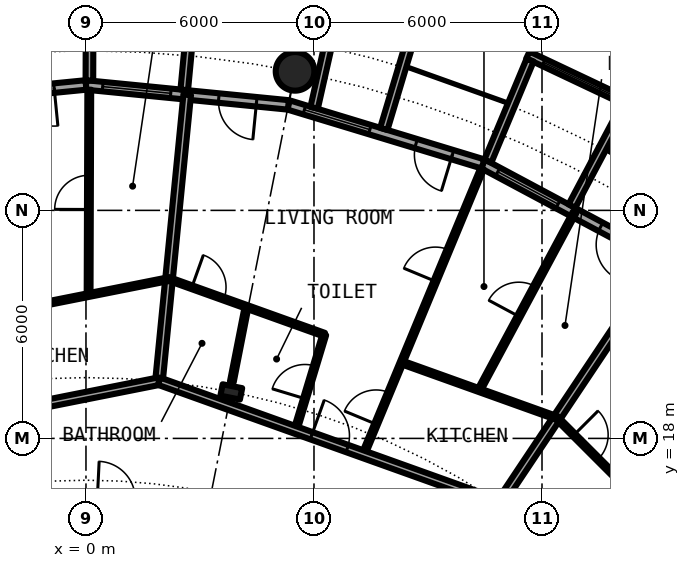
"""IFC4 building model, lengths in metres.
Left out: names, types, materials, properties, quantities, classifications, styles, units other than length and angle.
Written with IfcOpenShell. Run it as: python <this file> out.ifc"""

import sys

from ifc_helpers import new_model, si_unit, direction, frame, frame_2d, origin, origin_2d, place, context, subcontext, project, spatial, rectangle, circle, hollow_circle, i_section, extrude, element, fill, save


model = new_model("IFC4")
c1 = context("Model", 3, precision=1e-05, world=origin(), true_north=direction((0.0, 1.0)))
c2 = subcontext(c1, "Body", "Model", "MODEL_VIEW")
j1 = project(units=[si_unit("LENGTHUNIT", "METRE"), si_unit("PLANEANGLEUNIT", "RADIAN")], contexts=[c1])
p1 = place(None, origin())
s1 = spatial("IfcSite", under=j1, at=p1, CompositionType="ELEMENT")
p2 = place(p1, origin())
s2 = spatial("IfcBuilding", under=s1, at=p2, CompositionType="ELEMENT")
p3 = place(p2, frame((0.0, 0.0, 63.6)))
s3 = spatial("IfcBuildingStorey", under=s2, at=p3, CompositionType="ELEMENT", Elevation=63.6)
p4 = place(p3, frame((5.501, 27.658, 0.0), z_axis=(0.0, 0.0, 1.0), x_axis=(1.0, 0.0, 0.0)))
e1 = element("IfcColumn", 1, at=p4, inside=s3, PredefinedType="COLUMN", context=c2, shape_type="SweptSolid", body=[
    extrude(hollow_circle(Radius=0.508, WallThickness=0.04, at=origin_2d()), origin(), (0.0, 0.0, 1.0), 3.05),
])
p5 = place(p3, frame((3.824, 19.223, 0.0), z_axis=(0.0, 0.0, 1.0), x_axis=(0.195090322016, 0.980785280403, 0.0)))
e2 = element("IfcColumn", 2, at=p5, inside=s3, PredefinedType="COLUMN", context=c2, shape_type="SweptSolid", body=[
    extrude(i_section(OverallWidth=0.306, OverallDepth=0.524, WebThickness=0.021, FlangeThickness=0.04, FilletRadius=0.027, at=origin_2d()), origin(), (0.0, 0.0, 1.0), 3.05),
])
p6 = place(p3, frame((15.167, 22.699, 0.0), z_axis=(0.0, 0.0, 1.0), x_axis=(-0.881915646801, 0.471407246368, 0.0)))
e3 = element("IfcWall", 3, at=p6, inside=s3, PredefinedType="SOLIDWALL", context=c2, shape_type="SweptSolid", body=[
    extrude(rectangle(XDim=5.352, YDim=0.25, at=frame_2d((2.676, 0.0))), origin(), (0.0, 0.0, 1.0), 2.7),
])
p7 = place(p6, frame((0.841, 0.0, 0.0)))
e4 = element("IfcOpeningElement", 4, at=p7, cuts=e3, PredefinedType="OPENING", context=c2, shape_type="SweptSolid", body=[
    extrude(rectangle(XDim=1.0, YDim=2.2, at=frame_2d((0.5, 1.1))), frame((0.0, 0.135, 0.0), z_axis=(0.0, -1.0, 0.0), x_axis=(1.0, 0.0, 0.0)), (0.0, 0.0, 1.0), 0.27),
])
p8 = place(p6, frame((3.111, 0.0, 0.3)))
e5 = element("IfcOpeningElement", 5, at=p8, cuts=e3, PredefinedType="OPENING", context=c2, shape_type="SweptSolid", body=[
    extrude(rectangle(XDim=1.8, YDim=2.1, at=frame_2d((0.9, 1.05))), frame((0.0, 0.135, 0.0), z_axis=(0.0, -1.0, 0.0), x_axis=(1.0, 0.0, 0.0)), (0.0, 0.0, 1.0), 0.27),
])
p9 = place(p3, frame((14.335, 26.808, -0.03), z_axis=(0.0, 0.0, 1.0), x_axis=(-0.904000060331, 0.427532327342, 0.0)))
e6 = element("IfcWall", 6, at=p9, inside=s3, PredefinedType="SOLIDWALL", context=c2, shape_type="SweptSolid", body=[
    extrude(rectangle(XDim=2.993, YDim=0.2, at=frame_2d((1.497, 0.0))), origin(), (0.0, 0.0, 1.0), 2.73),
])
p10 = place(p9, frame((0.457, 0.0, 0.33)))
e7 = element("IfcOpeningElement", 7, at=p10, cuts=e6, PredefinedType="OPENING", context=c2, shape_type="SweptSolid", body=[
    extrude(circle(Radius=1.04, at=frame_2d((1.04, 1.04))), frame((0.0, 0.11, 0.0), z_axis=(0.0, -1.0, 0.0), x_axis=(1.0, 0.0, 0.0)), (0.0, 0.0, 1.0), 0.22),
])
p11 = place(p3, frame((12.787, 24.113, -0.03), z_axis=(0.0, 0.0, 1.0), x_axis=(0.468365282436, 0.883534924159, 0.0)))
e8 = element("IfcWall", 8, at=p11, inside=s3, PredefinedType="SOLIDWALL", context=c2, shape_type="SweptSolid", body=[
    extrude(rectangle(XDim=3.006, YDim=0.2, at=frame_2d((1.503, 0.0))), origin(), (0.0, 0.0, 1.0), 2.73),
])
p12 = place(p3, frame((10.575, 25.295, -0.03), z_axis=(0.0, 0.0, 1.0), x_axis=(0.385697364644, 0.922625353492, 0.0)))
e9 = element("IfcWall", 9, at=p12, inside=s3, PredefinedType="SOLIDWALL", context=c2, shape_type="SweptSolid", body=[
    extrude(rectangle(XDim=2.883, YDim=0.2, at=frame_2d((1.442, 0.0))), origin(), (0.0, 0.0, 1.0), 2.73),
])
p13 = place(p3, frame((10.447, 25.222, 0.0), z_axis=(0.0, 0.0, 1.0), x_axis=(-0.956965678721, 0.290201119486, 0.0)))
e10 = element("IfcWall", 10, at=p13, inside=s3, PredefinedType="SOLIDWALL", context=c2, shape_type="SweptSolid", body=[
    extrude(rectangle(XDim=5.351, YDim=0.25, at=frame_2d((2.676, 0.0))), origin(), (0.0, 0.0, 1.0), 2.7),
])
p14 = place(p13, frame((0.841, 0.0, 0.0)))
e11 = element("IfcOpeningElement", 11, at=p14, cuts=e10, PredefinedType="OPENING", context=c2, shape_type="SweptSolid", body=[
    extrude(rectangle(XDim=1.0, YDim=2.2, at=frame_2d((0.5, 1.1))), frame((0.0, 0.135, 0.0), z_axis=(0.0, -1.0, 0.0), x_axis=(1.0, 0.0, 0.0)), (0.0, 0.0, 1.0), 0.27),
])
p15 = place(p13, frame((3.111, 0.0, 0.3)))
e12 = element("IfcOpeningElement", 12, at=p15, cuts=e10, PredefinedType="OPENING", context=c2, shape_type="SweptSolid", body=[
    extrude(rectangle(XDim=1.8, YDim=2.1, at=frame_2d((0.9, 1.05))), frame((0.0, 0.135, 0.0), z_axis=(0.0, -1.0, 0.0), x_axis=(1.0, 0.0, 0.0)), (0.0, 0.0, 1.0), 0.27),
])
p16 = place(p3, frame((7.837, 26.144, -0.03), z_axis=(0.0, 0.0, 1.0), x_axis=(0.287064767992, 0.957911174889, 0.0)))
e13 = element("IfcWall", 13, at=p16, inside=s3, PredefinedType="SOLIDWALL", context=c2, shape_type="SweptSolid", body=[
    extrude(rectangle(XDim=3.006, YDim=0.2, at=frame_2d((1.503, 0.0))), origin(), (0.0, 0.0, 1.0), 2.73),
])
p17 = place(p3, frame((6.004, 26.7, -0.03), z_axis=(0.0, 0.0, 1.0), x_axis=(0.219609259383, 0.975587911566, 0.0)))
e14 = element("IfcWall", 14, at=p17, inside=s3, PredefinedType="SOLIDWALL", context=c2, shape_type="SweptSolid", body=[
    extrude(rectangle(XDim=2.933, YDim=0.2, at=frame_2d((1.466, 0.0))), origin(), (0.0, 0.0, 1.0), 2.73),
])
p18 = place(p3, frame((5.326, 26.775, 0.0), z_axis=(0.0, 0.0, 1.0), x_axis=(-0.995173996315, 0.098126026407, 0.0)))
e15 = element("IfcWall", 15, at=p18, inside=s3, PredefinedType="SOLIDWALL", context=c2, shape_type="SweptSolid", body=[
    extrude(rectangle(XDim=5.352, YDim=0.25, at=frame_2d((2.676, 0.0))), origin(), (0.0, 0.0, 1.0), 2.7),
])
p19 = place(p18, frame((0.841, 0.0, 0.0)))
e16 = element("IfcOpeningElement", 16, at=p19, cuts=e15, PredefinedType="OPENING", context=c2, shape_type="SweptSolid", body=[
    extrude(rectangle(XDim=1.0, YDim=2.2, at=frame_2d((0.5, 1.1))), frame((0.0, 0.135, 0.0), z_axis=(0.0, -1.0, 0.0), x_axis=(1.0, 0.0, 0.0)), (0.0, 0.0, 1.0), 0.27),
])
p20 = place(p18, frame((3.111, 0.0, 0.3)))
e17 = element("IfcOpeningElement", 17, at=p20, cuts=e15, PredefinedType="OPENING", context=c2, shape_type="SweptSolid", body=[
    extrude(rectangle(XDim=1.8, YDim=2.1, at=frame_2d((0.9, 1.05))), frame((0.0, 0.135, 0.0), z_axis=(0.0, -1.0, 0.0), x_axis=(1.0, 0.0, 0.0)), (0.0, 0.0, 1.0), 0.27),
])
p21 = place(p3, frame((2.586, 27.171, -0.03), z_axis=(0.0, 0.0, 1.0), x_axis=(0.094548432284, 0.995520262954, 0.0)))
e18 = element("IfcWall", 18, at=p21, inside=s3, PredefinedType="SOLIDWALL", context=c2, shape_type="SweptSolid", body=[
    extrude(rectangle(XDim=3.006, YDim=0.2, at=frame_2d((1.503, 0.0))), origin(), (0.0, 0.0, 1.0), 2.73),
])
p22 = place(p3, frame((0.09, 27.417, -0.03), z_axis=(0.0, 0.0, 1.0), x_axis=(0.00347308367, 0.999993968827, 0.0)))
e19 = element("IfcWall", 19, at=p22, inside=s3, PredefinedType="SOLIDWALL", context=c2, shape_type="SweptSolid", body=[
    extrude(rectangle(XDim=2.882, YDim=0.2, at=frame_2d((1.441, 0.0))), origin(), (0.0, 0.0, 1.0), 2.73),
])
p23 = place(p3, frame((0.0, 27.3, 0.0), z_axis=(0.0, 0.0, 1.0), x_axis=(-0.995173996315, -0.098126026407, 0.0)))
e20 = element("IfcWall", 20, at=p23, inside=s3, PredefinedType="SOLIDWALL", context=c2, shape_type="SweptSolid", body=[
    extrude(rectangle(XDim=5.352, YDim=0.25, at=frame_2d((2.676, 0.0))), origin(), (0.0, 0.0, 1.0), 2.7),
])
p24 = place(p23, frame((0.841, 0.0, 0.0)))
e21 = element("IfcOpeningElement", 21, at=p24, cuts=e20, PredefinedType="OPENING", context=c2, shape_type="SweptSolid", body=[
    extrude(rectangle(XDim=1.0, YDim=2.2, at=frame_2d((0.5, 1.1))), frame((0.0, 0.135, 0.0), z_axis=(0.0, -1.0, 0.0), x_axis=(1.0, 0.0, 0.0)), (0.0, 0.0, 1.0), 0.27),
])
p25 = place(p23, frame((3.111, 0.0, 0.3)))
e22 = element("IfcOpeningElement", 22, at=p25, cuts=e20, PredefinedType="OPENING", context=c2, shape_type="SweptSolid", body=[
    extrude(rectangle(XDim=1.8, YDim=2.1, at=frame_2d((0.9, 1.05))), frame((0.0, 0.135, 0.0), z_axis=(0.0, -1.0, 0.0), x_axis=(1.0, 0.0, 0.0)), (0.0, 0.0, 1.0), 0.27),
])
p26 = place(p3, frame((0.069, 21.772, 0.0), z_axis=(0.0, 0.0, 1.0), x_axis=(0.003298522564, 0.99999455986, 0.0)))
e23 = element("IfcWall", 23, at=p26, inside=s3, PredefinedType="PARTITIONING", context=c2, shape_type="SweptSolid", body=[
    extrude(rectangle(XDim=5.403, YDim=0.1, at=frame_2d((2.702, 0.0))), origin(), (0.0, 0.0, 1.0), 2.7),
])
p27 = place(p26, frame((2.252, 0.0, 0.0)))
e24 = element("IfcOpeningElement", 24, at=p27, cuts=e23, PredefinedType="OPENING", context=c2, shape_type="SweptSolid", body=[
    extrude(rectangle(XDim=0.9, YDim=2.3, at=frame_2d((0.45, 1.15))), frame((0.0, 0.06, 0.0), z_axis=(0.0, -1.0, 0.0), x_axis=(1.0, 0.0, 0.0)), (0.0, 0.0, 1.0), 0.12),
])
p28 = place(p3, frame((1.921, 19.506, 0.0), z_axis=(0.0, 0.0, 1.0), x_axis=(0.098115395479, 0.995175044487, 0.0)))
e25 = element("IfcWall", 25, at=p28, inside=s3, PredefinedType="PARTITIONING", context=c2, shape_type="SweptSolid", body=[
    extrude(rectangle(XDim=7.574, YDim=0.2, at=frame_2d((3.787, 0.0))), origin(), (0.0, 0.0, 1.0), 2.7),
])
p29 = place(p3, frame((3.838, 19.488, 0.0), z_axis=(0.0, 0.0, 1.0), x_axis=(0.192964397841, 0.981205758832, 0.0)))
e26 = element("IfcWall", 26, at=p29, inside=s3, PredefinedType="PARTITIONING", context=c2, shape_type="SweptSolid", body=[
    extrude(rectangle(XDim=2.012, YDim=0.1, at=frame_2d((1.006, 0.0))), origin(), (0.0, 0.0, 1.0), 2.7),
])
p30 = place(p3, frame((5.513, 18.22, 0.0), z_axis=(0.0, 0.0, 1.0), x_axis=(0.289456951726, 0.957191032709, 0.0)))
e27 = element("IfcWall", 27, at=p30, inside=s3, PredefinedType="PARTITIONING", context=c2, shape_type="SweptSolid", body=[
    extrude(rectangle(XDim=2.622, YDim=0.1, at=frame_2d((1.311, 0.0))), origin(), (0.0, 0.0, 1.0), 2.7),
])
p31 = place(p30, frame((0.862, 0.0, 0.0)))
e28 = element("IfcOpeningElement", 28, at=p31, cuts=e27, PredefinedType="OPENING", context=c2, shape_type="SweptSolid", body=[
    extrude(rectangle(XDim=0.9, YDim=2.3, at=frame_2d((0.45, 1.15))), frame((0.0, 0.06, 0.0), z_axis=(0.0, -1.0, 0.0), x_axis=(1.0, 0.0, 0.0)), (0.0, 0.0, 1.0), 0.12),
])
p32 = place(p3, frame((7.302, 17.58, 0.0), z_axis=(0.0, 0.0, 1.0), x_axis=(0.383616168183, 0.923492628833, 0.0)))
e29 = element("IfcWall", 29, at=p32, inside=s3, PredefinedType="PARTITIONING", context=c2, shape_type="SweptSolid", body=[
    extrude(rectangle(XDim=8.138, YDim=0.1, at=frame_2d((4.069, 0.0))), origin(), (0.0, 0.0, 1.0), 2.7),
])
p33 = place(p32, frame((0.861, 0.0, 0.0)))
e30 = element("IfcOpeningElement", 30, at=p33, cuts=e29, PredefinedType="OPENING", context=c2, shape_type="SweptSolid", body=[
    extrude(rectangle(XDim=0.9, YDim=2.3, at=frame_2d((0.45, 1.15))), frame((0.0, 0.06, 0.0), z_axis=(0.0, -1.0, 0.0), x_axis=(1.0, 0.0, 0.0)), (0.0, 0.0, 1.0), 0.12),
])
p34 = place(p32, frame((4.931, 0.0, 0.0)))
e31 = element("IfcOpeningElement", 31, at=p34, cuts=e29, PredefinedType="OPENING", context=c2, shape_type="SweptSolid", body=[
    extrude(rectangle(XDim=0.9, YDim=2.3, at=frame_2d((0.45, 1.15))), frame((0.0, 0.06, 0.0), z_axis=(0.0, -1.0, 0.0), x_axis=(1.0, 0.0, 0.0)), (0.0, 0.0, 1.0), 0.12),
])
p35 = place(p3, frame((10.349, 19.272, 0.0), z_axis=(0.0, 0.0, 1.0), x_axis=(0.472967735543, 0.881079747319, 0.0)))
e32 = element("IfcWall", 32, at=p35, inside=s3, PredefinedType="PARTITIONING", context=c2, shape_type="SweptSolid", body=[
    extrude(rectangle(XDim=5.3, YDim=0.1, at=frame_2d((2.65, 0.0))), origin(), (0.0, 0.0, 1.0), 2.7),
])
p36 = place(p35, frame((2.2, 0.0, 0.0)))
e33 = element("IfcOpeningElement", 33, at=p36, cuts=e32, PredefinedType="OPENING", context=c2, shape_type="SweptSolid", body=[
    extrude(rectangle(XDim=0.9, YDim=2.3, at=frame_2d((0.45, 1.15))), frame((0.0, 0.06, 0.0), z_axis=(0.0, -1.0, 0.0), x_axis=(1.0, 0.0, 0.0)), (0.0, 0.0, 1.0), 0.12),
])
p37 = place(p3, frame((11.035, 16.515, 0.0), z_axis=(0.0, 0.0, 1.0), x_axis=(0.555516661303, 0.831505405283, 0.0)))
e34 = element("IfcWall", 34, at=p37, inside=s3, PredefinedType="PARTITIONING", context=c2, shape_type="SweptSolid", body=[
    extrude(rectangle(XDim=7.312, YDim=0.2, at=frame_2d((3.656, 0.0))), origin(), (0.0, 0.0, 1.0), 2.7),
])
p38 = place(p3, frame((-9.239, 17.286, 0.0), z_axis=(0.0, 0.0, 1.0), x_axis=(0.98077905287, 0.195121627328, 0.0)))
e35 = element("IfcWall", 35, at=p38, inside=s3, PredefinedType="PARTITIONING", context=c2, shape_type="SweptSolid", body=[
    extrude(rectangle(XDim=11.379, YDim=0.2, at=frame_2d((5.689, 0.0))), origin(), (0.0, 0.0, 1.0), 2.38),
])
p39 = place(p38, frame((4.241, 0.0, 0.0)))
e36 = element("IfcOpeningElement", 36, at=p39, cuts=e35, PredefinedType="OPENING", context=c2, shape_type="SweptSolid", body=[
    extrude(rectangle(XDim=1.0, YDim=2.3, at=frame_2d((0.5, 1.15))), frame((0.0, 0.11, 0.0), z_axis=(0.0, -1.0, 0.0), x_axis=(1.0, 0.0, 0.0)), (0.0, 0.0, 1.0), 0.22),
])
p40 = place(p3, frame((1.924, 19.505, 0.0), z_axis=(0.0, 0.0, 1.0), x_axis=(0.941497449807, -0.337020106237, 0.0)))
e37 = element("IfcWall", 37, at=p40, inside=s3, PredefinedType="PARTITIONING", context=c2, shape_type="SweptSolid", body=[
    extrude(rectangle(XDim=9.364, YDim=0.2, at=frame_2d((4.682, 0.0))), origin(), (0.0, 0.0, 1.0), 2.38),
])
p41 = place(p40, frame((4.259, 0.0, 0.0)))
e38 = element("IfcOpeningElement", 38, at=p41, cuts=e37, PredefinedType="OPENING", context=c2, shape_type="SweptSolid", body=[
    extrude(rectangle(XDim=1.0, YDim=2.3, at=frame_2d((0.5, 1.15))), frame((0.0, 0.11, 0.0), z_axis=(0.0, -1.0, 0.0), x_axis=(1.0, 0.0, 0.0)), (0.0, 0.0, 1.0), 0.22),
])
p42 = place(p3, frame((-4.163, 20.93, 0.0), z_axis=(0.0, 0.0, 1.0), x_axis=(0.98077745026, 0.195129682675, 0.0)))
e39 = element("IfcWall", 39, at=p42, inside=s3, PredefinedType="PARTITIONING", context=c2, shape_type="SweptSolid", body=[
    extrude(rectangle(XDim=6.474, YDim=0.1, at=frame_2d((3.237, 0.0))), origin(), (0.0, 0.0, 1.0), 2.7),
])
p43 = place(p3, frame((2.186, 22.193, 0.0), z_axis=(0.0, 0.0, 1.0), x_axis=(0.941413199806, -0.337255373909, 0.0)))
e40 = element("IfcWall", 40, at=p43, inside=s3, PredefinedType="PARTITIONING", context=c2, shape_type="SweptSolid", body=[
    extrude(rectangle(XDim=4.341, YDim=0.1, at=frame_2d((2.171, 0.0))), origin(), (0.0, 0.0, 1.0), 2.7),
])
p44 = place(p43, frame((0.637, 0.0, 0.0)))
e41 = element("IfcOpeningElement", 41, at=p44, cuts=e40, PredefinedType="OPENING", context=c2, shape_type="SweptSolid", body=[
    extrude(rectangle(XDim=0.9, YDim=2.3, at=frame_2d((0.45, 1.15))), frame((0.0, 0.06, 0.0), z_axis=(0.0, -1.0, 0.0), x_axis=(1.0, 0.0, 0.0)), (0.0, 0.0, 1.0), 0.12),
])
p45 = place(p3, frame((8.318, 19.996, 0.0), z_axis=(0.0, 0.0, 1.0), x_axis=(0.941370462946, -0.337374645598, 0.0)))
e42 = element("IfcWall", 42, at=p45, inside=s3, PredefinedType="PARTITIONING", context=c2, shape_type="SweptSolid", body=[
    extrude(rectangle(XDim=4.334, YDim=0.1, at=frame_2d((2.167, 0.0))), origin(), (0.0, 0.0, 1.0), 2.7),
])
p46 = place(p3, frame((12.389, 18.542, 0.0), z_axis=(0.0, 0.0, 1.0), x_axis=(0.707022606819, -0.707190945535, 0.0)))
e43 = element("IfcWall", 43, at=p46, inside=s3, PredefinedType="PARTITIONING", context=c2, shape_type="SweptSolid", body=[
    extrude(rectangle(XDim=4.351, YDim=0.1, at=frame_2d((2.175, 0.0))), origin(), (0.0, 0.0, 1.0), 2.7),
])
p47 = place(p46, frame((0.639, 0.0, 0.0)))
e44 = element("IfcOpeningElement", 44, at=p47, cuts=e43, PredefinedType="OPENING", context=c2, shape_type="SweptSolid", body=[
    extrude(rectangle(XDim=0.9, YDim=2.3, at=frame_2d((0.45, 1.15))), frame((0.0, 0.06, 0.0), z_axis=(0.0, -1.0, 0.0), x_axis=(1.0, 0.0, 0.0)), (0.0, 0.0, 1.0), 0.12),
])
p48 = place(p7, origin())
e45 = element("IfcDoor", 45, at=p48, inside=s3, OperationType="SINGLE_SWING_LEFT", PredefinedType="DOOR", context=c2, shape_type="SweptSolid", body=[
    extrude(rectangle(XDim=1.0, YDim=2.2, at=frame_2d((0.5, 1.1))), frame((0.0, 0.025, 0.0), z_axis=(0.0, -1.0, 0.0), x_axis=(1.0, 0.0, 0.0)), (0.0, 0.0, 1.0), 0.05),
])
fill(e4, e45)
p49 = place(p8, origin())
e46 = element("IfcWindow", 46, at=p49, inside=s3, PartitioningType="SINGLE_PANEL", PredefinedType="WINDOW", context=c2, shape_type="SweptSolid", body=[
    extrude(rectangle(XDim=1.8, YDim=2.1, at=frame_2d((0.9, 1.05))), frame((0.0, 0.03, 0.0), z_axis=(0.0, -1.0, 0.0), x_axis=(1.0, 0.0, 0.0)), (0.0, 0.0, 1.0), 0.06),
])
fill(e5, e46)
p50 = place(p10, origin())
e47 = element("IfcWindow", 47, at=p50, inside=s3, PartitioningType="SINGLE_PANEL", PredefinedType="WINDOW", context=c2, shape_type="SweptSolid", body=[
    extrude(circle(Radius=1.04, at=frame_2d((1.04, 1.04))), frame((0.0, 0.03, 0.0), z_axis=(0.0, -1.0, 0.0), x_axis=(1.0, 0.0, 0.0)), (0.0, 0.0, 1.0), 0.06),
])
fill(e7, e47)
p51 = place(p14, origin())
e48 = element("IfcDoor", 48, at=p51, inside=s3, OperationType="SINGLE_SWING_LEFT", PredefinedType="DOOR", context=c2, shape_type="SweptSolid", body=[
    extrude(rectangle(XDim=1.0, YDim=2.2, at=frame_2d((0.5, 1.1))), frame((0.0, 0.025, 0.0), z_axis=(0.0, -1.0, 0.0), x_axis=(1.0, 0.0, 0.0)), (0.0, 0.0, 1.0), 0.05),
])
fill(e11, e48)
p52 = place(p15, origin())
e49 = element("IfcWindow", 49, at=p52, inside=s3, PartitioningType="SINGLE_PANEL", PredefinedType="WINDOW", context=c2, shape_type="SweptSolid", body=[
    extrude(rectangle(XDim=1.8, YDim=2.1, at=frame_2d((0.9, 1.05))), frame((0.0, 0.03, 0.0), z_axis=(0.0, -1.0, 0.0), x_axis=(1.0, 0.0, 0.0)), (0.0, 0.0, 1.0), 0.06),
])
fill(e12, e49)
p53 = place(p19, origin())
e50 = element("IfcDoor", 50, at=p53, inside=s3, OperationType="SINGLE_SWING_LEFT", PredefinedType="DOOR", context=c2, shape_type="SweptSolid", body=[
    extrude(rectangle(XDim=1.0, YDim=2.2, at=frame_2d((0.5, 1.1))), frame((0.0, 0.025, 0.0), z_axis=(0.0, -1.0, 0.0), x_axis=(1.0, 0.0, 0.0)), (0.0, 0.0, 1.0), 0.05),
])
fill(e16, e50)
p54 = place(p20, origin())
e51 = element("IfcWindow", 51, at=p54, inside=s3, PartitioningType="SINGLE_PANEL", PredefinedType="WINDOW", context=c2, shape_type="SweptSolid", body=[
    extrude(rectangle(XDim=1.8, YDim=2.1, at=frame_2d((0.9, 1.05))), frame((0.0, 0.03, 0.0), z_axis=(0.0, -1.0, 0.0), x_axis=(1.0, 0.0, 0.0)), (0.0, 0.0, 1.0), 0.06),
])
fill(e17, e51)
p55 = place(p24, origin())
e52 = element("IfcDoor", 52, at=p55, inside=s3, OperationType="SINGLE_SWING_LEFT", PredefinedType="DOOR", context=c2, shape_type="SweptSolid", body=[
    extrude(rectangle(XDim=1.0, YDim=2.2, at=frame_2d((0.5, 1.1))), frame((0.0, 0.025, 0.0), z_axis=(0.0, -1.0, 0.0), x_axis=(1.0, 0.0, 0.0)), (0.0, 0.0, 1.0), 0.05),
])
fill(e21, e52)
p56 = place(p47, origin())
e53 = element("IfcDoor", 53, at=p56, inside=s3, OperationType="SINGLE_SWING_LEFT", PredefinedType="DOOR", context=c2, shape_type="SweptSolid", body=[
    extrude(rectangle(XDim=0.9, YDim=2.3, at=frame_2d((0.45, 1.15))), frame((0.0, 0.025, 0.0), z_axis=(0.0, -1.0, 0.0), x_axis=(1.0, 0.0, 0.0)), (0.0, 0.0, 1.0), 0.05),
])
fill(e44, e53)
p57 = place(p41, origin())
e54 = element("IfcDoor", 54, at=p57, inside=s3, OperationType="SINGLE_SWING_RIGHT", PredefinedType="DOOR", context=c2, shape_type="SweptSolid", body=[
    extrude(rectangle(XDim=1.0, YDim=2.3, at=frame_2d((0.5, 1.15))), frame((0.0, 0.025, 0.0), z_axis=(0.0, -1.0, 0.0), x_axis=(1.0, 0.0, 0.0)), (0.0, 0.0, 1.0), 0.05),
])
fill(e38, e54)
p58 = place(p44, origin())
e55 = element("IfcDoor", 55, at=p58, inside=s3, OperationType="SINGLE_SWING_LEFT", PredefinedType="DOOR", context=c2, shape_type="SweptSolid", body=[
    extrude(rectangle(XDim=0.9, YDim=2.3, at=frame_2d((0.45, 1.15))), frame((0.0, 0.025, 0.0), z_axis=(0.0, -1.0, 0.0), x_axis=(1.0, 0.0, 0.0)), (0.0, 0.0, 1.0), 0.05),
])
fill(e41, e55)
p59 = place(p31, origin())
e56 = element("IfcDoor", 56, at=p59, inside=s3, OperationType="SINGLE_SWING_RIGHT", PredefinedType="DOOR", context=c2, shape_type="SweptSolid", body=[
    extrude(rectangle(XDim=0.9, YDim=2.3, at=frame_2d((0.45, 1.15))), frame((0.0, 0.025, 0.0), z_axis=(0.0, -1.0, 0.0), x_axis=(1.0, 0.0, 0.0)), (0.0, 0.0, 1.0), 0.05),
])
fill(e28, e56)
p60 = place(p33, origin())
e57 = element("IfcDoor", 57, at=p60, inside=s3, OperationType="SINGLE_SWING_LEFT", PredefinedType="DOOR", context=c2, shape_type="SweptSolid", body=[
    extrude(rectangle(XDim=0.9, YDim=2.3, at=frame_2d((0.45, 1.15))), frame((0.0, 0.025, 0.0), z_axis=(0.0, -1.0, 0.0), x_axis=(1.0, 0.0, 0.0)), (0.0, 0.0, 1.0), 0.05),
])
fill(e30, e57)
p61 = place(p34, origin())
e58 = element("IfcDoor", 58, at=p61, inside=s3, OperationType="SINGLE_SWING_RIGHT", PredefinedType="DOOR", context=c2, shape_type="SweptSolid", body=[
    extrude(rectangle(XDim=0.9, YDim=2.3, at=frame_2d((0.45, 1.15))), frame((0.0, 0.025, 0.0), z_axis=(0.0, -1.0, 0.0), x_axis=(1.0, 0.0, 0.0)), (0.0, 0.0, 1.0), 0.05),
])
fill(e31, e58)
p62 = place(p36, origin())
e59 = element("IfcDoor", 59, at=p62, inside=s3, OperationType="SINGLE_SWING_RIGHT", PredefinedType="DOOR", context=c2, shape_type="SweptSolid", body=[
    extrude(rectangle(XDim=0.9, YDim=2.3, at=frame_2d((0.45, 1.15))), frame((0.0, 0.025, 0.0), z_axis=(0.0, -1.0, 0.0), x_axis=(1.0, 0.0, 0.0)), (0.0, 0.0, 1.0), 0.05),
])
fill(e33, e59)
p63 = place(p27, origin())
e60 = element("IfcDoor", 60, at=p63, inside=s3, OperationType="SINGLE_SWING_LEFT", PredefinedType="DOOR", context=c2, shape_type="SweptSolid", body=[
    extrude(rectangle(XDim=0.9, YDim=2.3, at=frame_2d((0.45, 1.15))), frame((0.0, 0.025, 0.0), z_axis=(0.0, -1.0, 0.0), x_axis=(1.0, 0.0, 0.0)), (0.0, 0.0, 1.0), 0.05),
])
fill(e24, e60)
save(model, sys.argv[1])
